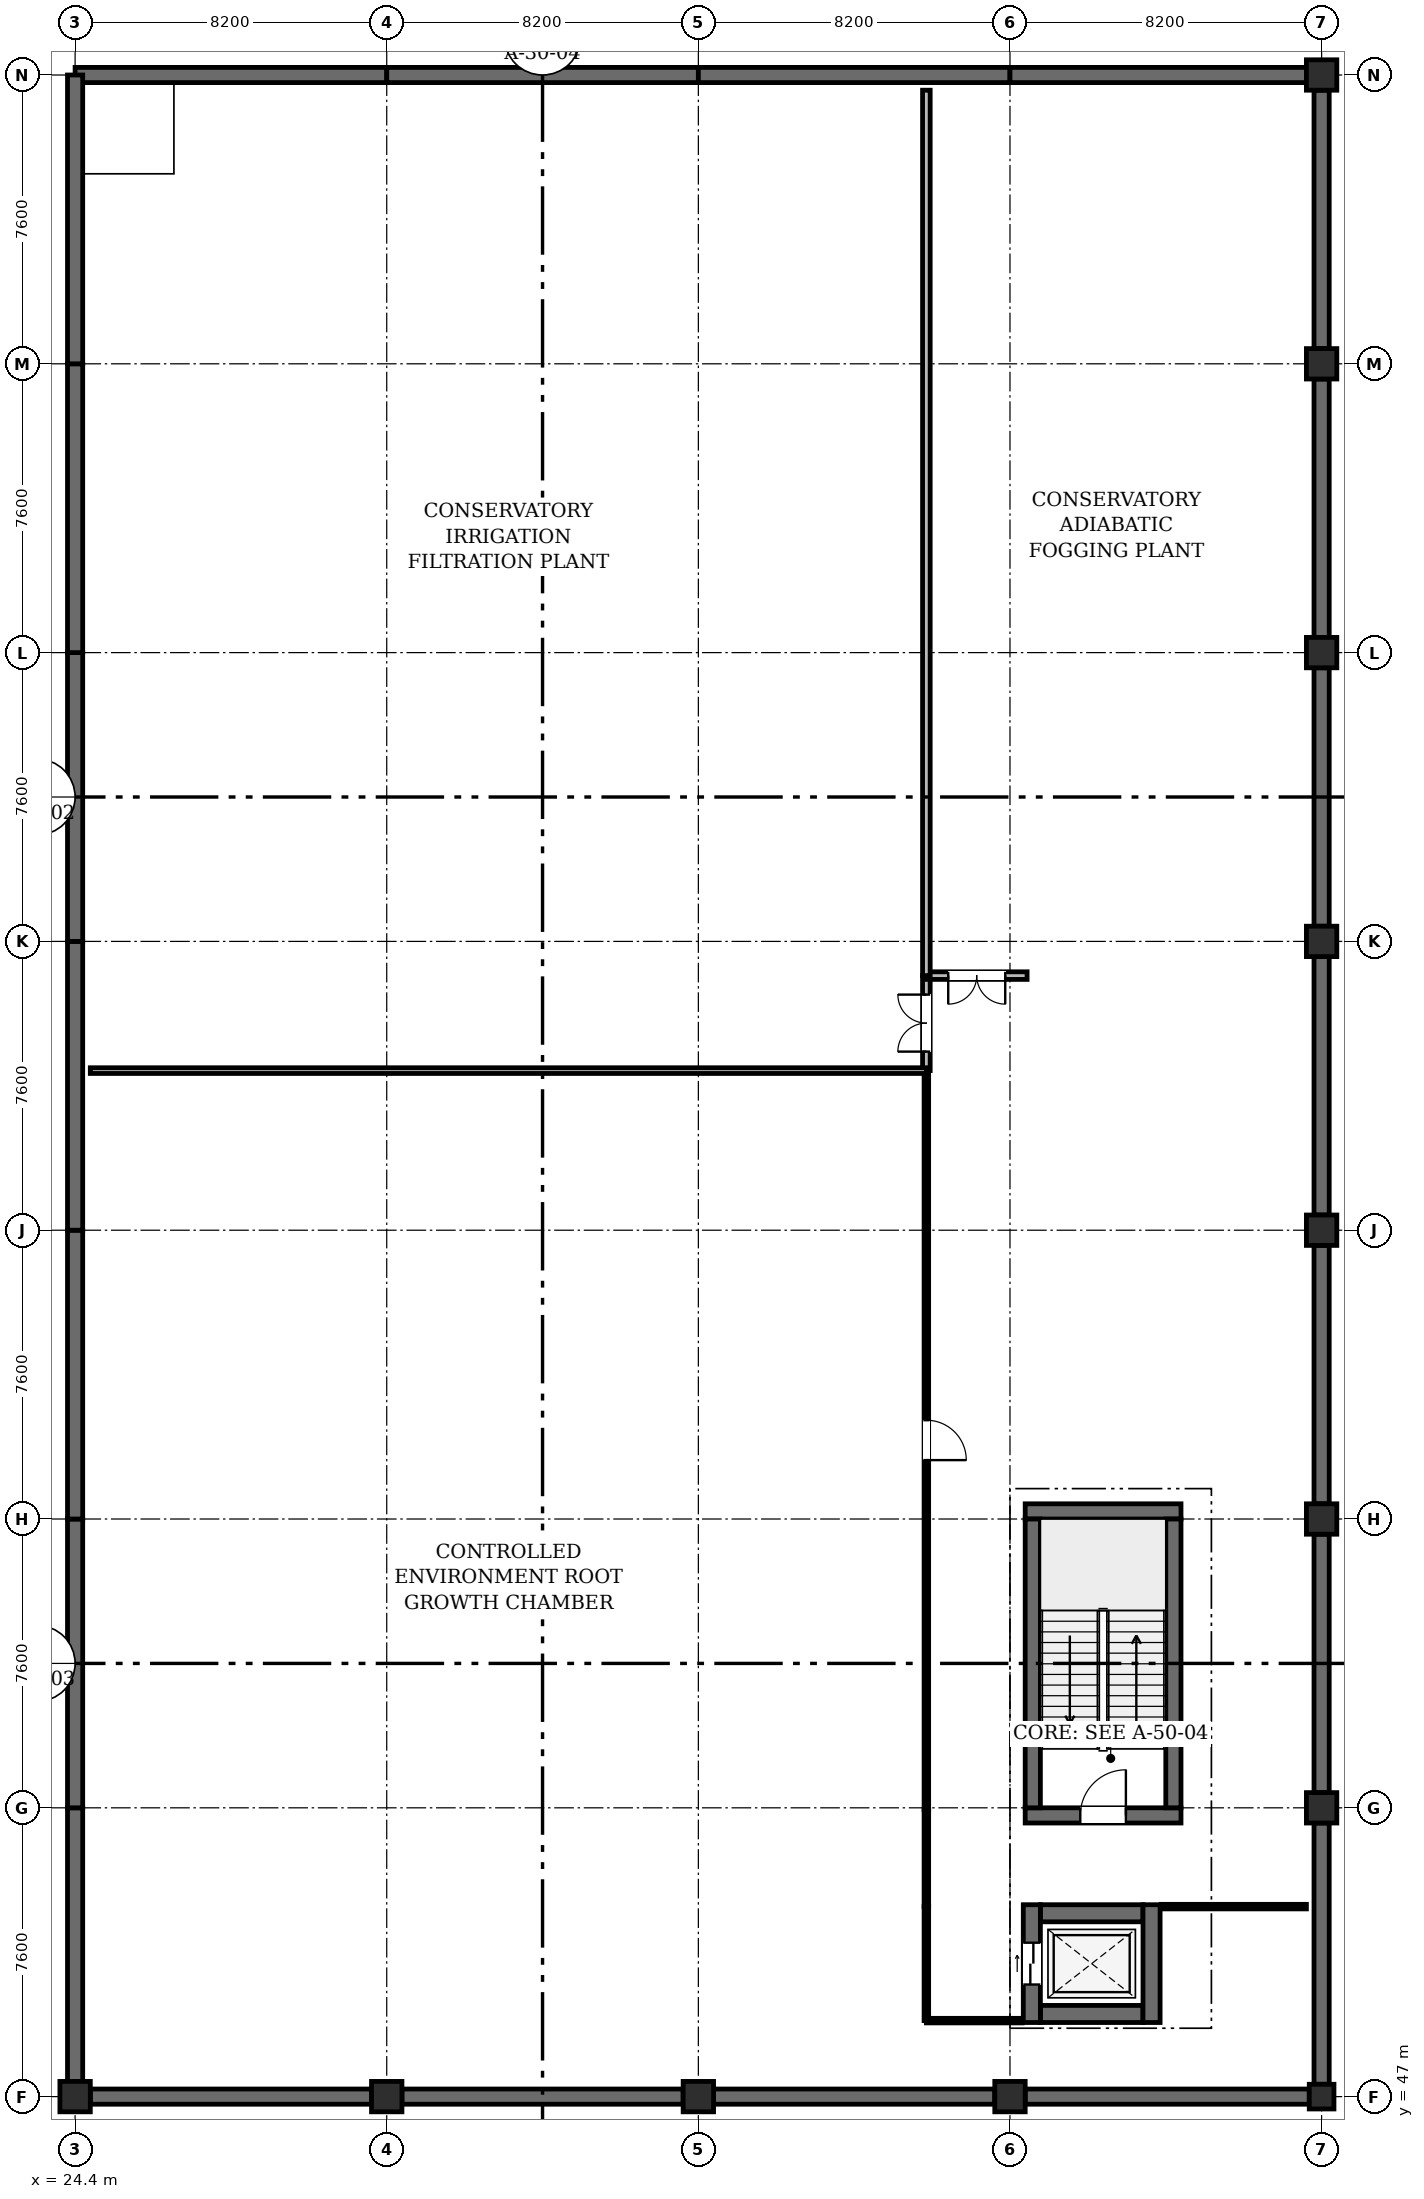
"""IFC4 building model, lengths in metres.
Left out: names, types, materials, properties, quantities, classifications, styles, units other than length and angle.
Written with IfcOpenShell. Run it as: python <this file> out.ifc"""

import sys

from ifc_helpers import new_model, si_unit, direction, frame, frame_2d, origin, origin_2d, place, context, subcontext, project, spatial, rectangle, circle, extrude, element, fill, save


model = new_model("IFC4")
c1 = context("Model", 3, precision=1e-05, world=origin(), true_north=direction((0.0, 1.0)))
c2 = subcontext(c1, "Body", "Model", "MODEL_VIEW")
j1 = project(units=[si_unit("LENGTHUNIT", "METRE"), si_unit("PLANEANGLEUNIT", "RADIAN")], contexts=[c1])
p1 = place(None, origin())
s1 = spatial("IfcSite", under=j1, at=p1, CompositionType="ELEMENT")
p2 = place(p1, origin())
s2 = spatial("IfcBuilding", under=s1, at=p2, CompositionType="ELEMENT")
p3 = place(p2, frame((0.0, 0.0, -4.8)))
s3 = spatial("IfcBuildingStorey", under=s2, at=p3, CompositionType="ELEMENT", Elevation=-4.8)
for number, where, z_axis, x_axis in (
    (1, (24.4, 47.0, 0.0), (0.0, 0.0, 1.0), (1.0, 0.0, 0.0)),
    (2, (32.6, 47.0, 0.0), (0.0, 0.0, 1.0), (1.0, 0.0, 0.0)),
    (3, (40.8, 47.0, 0.0), (0.0, 0.0, 1.0), (1.0, 0.0, 0.0)),
    (4, (49.0, 47.0, 0.0), (0.0, 0.0, 1.0), (1.0, 0.0, 0.0)),
):
    element("IfcColumn", number, at=place(p3, frame(where, z_axis=z_axis, x_axis=x_axis)), inside=s3, PredefinedType="COLUMN", context=c2, shape_type="SweptSolid", body=[
        extrude(circle(Radius=0.4, at=origin_2d()), origin(), (0.0, 0.0, 1.0), 4.46),
    ])
p4 = place(p3, frame((57.2, 47.0, 0.0), z_axis=(0.0, 0.0, 1.0), x_axis=(1.0, 0.0, 0.0)))
e5 = element("IfcColumn", 5, at=p4, inside=s3, PredefinedType="COLUMN", context=c2, shape_type="SweptSolid", body=[
    extrude(rectangle(XDim=0.65, YDim=0.65, at=origin_2d()), origin(), (0.0, 0.0, 1.0), 4.46),
])
for number, where, z_axis, x_axis in (
    (6, (57.2, 54.6, 0.0), (0.0, 0.0, 1.0), (1.0, 0.0, 0.0)),
    (7, (57.2, 62.2, 0.0), (0.0, 0.0, 1.0), (1.0, 0.0, 0.0)),
    (8, (57.2, 69.8, 0.0), (0.0, 0.0, 1.0), (1.0, 0.0, 0.0)),
    (9, (57.2, 77.4, 0.0), (0.0, 0.0, 1.0), (1.0, 0.0, 0.0)),
    (10, (57.2, 85.0, 0.0), (0.0, 0.0, 1.0), (1.0, 0.0, 0.0)),
    (11, (57.2, 92.6, 0.0), (0.0, 0.0, 1.0), (1.0, 0.0, 0.0)),
    (12, (57.2, 100.2, 0.0), (0.0, 0.0, 1.0), (1.0, 0.0, 0.0)),
):
    element("IfcColumn", number, at=place(p3, frame(where, z_axis=z_axis, x_axis=x_axis)), inside=s3, PredefinedType="COLUMN", context=c2, shape_type="SweptSolid", body=[
        extrude(circle(Radius=0.4, at=origin_2d()), origin(), (0.0, 0.0, 1.0), 4.46),
    ])
p5 = place(p3, frame((24.4, 100.2, 0.0), z_axis=(0.0, 0.0, 1.0), x_axis=(1.0, 0.0, 0.0)))
e13 = element("IfcWall", 13, at=p5, inside=s3, PredefinedType="SOLIDWALL", context=c2, shape_type="SweptSolid", body=[
    extrude(rectangle(XDim=8.2, YDim=0.4, at=frame_2d((4.1, 0.0))), origin(), (0.0, 0.0, 1.0), 4.46),
])
for number, where, z_axis, x_axis in (
    (14, (32.6, 100.2, 0.0), (0.0, 0.0, 1.0), (1.0, 0.0, 0.0)),
    (15, (40.8, 100.2, 0.0), (0.0, 0.0, 1.0), (1.0, 0.0, 0.0)),
):
    element("IfcWall", number, at=place(p3, frame(where, z_axis=z_axis, x_axis=x_axis)), inside=s3, PredefinedType="SOLIDWALL", context=c2, shape_type="SweptSolid", body=[
        extrude(rectangle(XDim=8.2, YDim=0.4, at=frame_2d((4.1, 0.0))), origin(), (0.0, 0.0, 1.0), 4.46),
    ])
p6 = place(p3, frame((49.0, 100.2, 0.0), z_axis=(0.0, 0.0, 1.0), x_axis=(1.0, 0.0, 0.0)))
e16 = element("IfcWall", 16, at=p6, inside=s3, PredefinedType="SOLIDWALL", context=c2, shape_type="SweptSolid", body=[
    extrude(rectangle(XDim=7.8, YDim=0.4, at=frame_2d((3.9, 0.0))), origin(), (0.0, 0.0, 1.0), 4.46),
])
p7 = place(p3, frame((57.2, 47.325, 0.0), z_axis=(0.0, 0.0, 1.0), x_axis=(0.0, 1.0, 0.0)))
e17 = element("IfcWall", 17, at=p7, inside=s3, PredefinedType="SOLIDWALL", context=c2, shape_type="SweptSolid", body=[
    extrude(rectangle(XDim=6.875, YDim=0.4, at=frame_2d((3.438, 0.0))), origin(), (0.0, 0.0, 1.0), 4.46),
])
p8 = place(p3, frame((57.2, 55.0, 0.0), z_axis=(0.0, 0.0, 1.0), x_axis=(0.0, 1.0, 0.0)))
e18 = element("IfcWall", 18, at=p8, inside=s3, PredefinedType="SOLIDWALL", context=c2, shape_type="SweptSolid", body=[
    extrude(rectangle(XDim=6.8, YDim=0.4, at=frame_2d((3.4, 0.0))), origin(), (0.0, 0.0, 1.0), 4.46),
])
p9 = place(p3, frame((57.2, 62.6, 0.0), z_axis=(0.0, 0.0, 1.0), x_axis=(0.0, 1.0, 0.0)))
e19 = element("IfcWall", 19, at=p9, inside=s3, PredefinedType="SOLIDWALL", context=c2, shape_type="SweptSolid", body=[
    extrude(rectangle(XDim=6.8, YDim=0.4, at=frame_2d((3.4, 0.0))), origin(), (0.0, 0.0, 1.0), 4.46),
])
for number, where, z_axis, x_axis in (
    (20, (57.2, 70.2, 0.0), (0.0, 0.0, 1.0), (0.0, 1.0, 0.0)),
    (21, (57.2, 77.8, 0.0), (0.0, 0.0, 1.0), (0.0, 1.0, 0.0)),
    (22, (57.2, 85.4, 0.0), (0.0, 0.0, 1.0), (0.0, 1.0, 0.0)),
    (23, (57.2, 93.0, 0.0), (0.0, 0.0, 1.0), (0.0, 1.0, 0.0)),
):
    element("IfcWall", number, at=place(p3, frame(where, z_axis=z_axis, x_axis=x_axis)), inside=s3, PredefinedType="SOLIDWALL", context=c2, shape_type="SweptSolid", body=[
        extrude(rectangle(XDim=6.8, YDim=0.4, at=frame_2d((3.4, 0.0))), origin(), (0.0, 0.0, 1.0), 4.46),
    ])
for number, where, z_axis, x_axis in (
    (24, (24.8, 47.0, 0.0), (0.0, 0.0, 1.0), (1.0, 0.0, 0.0)),
    (25, (33.0, 47.0, 0.0), (0.0, 0.0, 1.0), (1.0, 0.0, 0.0)),
):
    element("IfcWall", number, at=place(p3, frame(where, z_axis=z_axis, x_axis=x_axis)), inside=s3, PredefinedType="SOLIDWALL", context=c2, shape_type="SweptSolid", body=[
        extrude(rectangle(XDim=7.4, YDim=0.4, at=frame_2d((3.7, 0.0))), origin(), (0.0, 0.0, 1.0), 4.46),
    ])
p10 = place(p3, frame((41.2, 47.0, 0.0), z_axis=(0.0, 0.0, 1.0), x_axis=(1.0, 0.0, 0.0)))
e26 = element("IfcWall", 26, at=p10, inside=s3, PredefinedType="SOLIDWALL", context=c2, shape_type="SweptSolid", body=[
    extrude(rectangle(XDim=7.4, YDim=0.4, at=frame_2d((3.7, 0.0))), origin(), (0.0, 0.0, 1.0), 4.46),
])
p11 = place(p3, frame((49.4, 47.0, 0.0), z_axis=(0.0, 0.0, 1.0), x_axis=(1.0, 0.0, 0.0)))
e27 = element("IfcWall", 27, at=p11, inside=s3, PredefinedType="SOLIDWALL", context=c2, shape_type="SweptSolid", body=[
    extrude(rectangle(XDim=7.475, YDim=0.4, at=frame_2d((3.738, 0.0))), origin(), (0.0, 0.0, 1.0), 4.46),
])
p12 = place(p3, frame((24.4, 47.4, 0.0), z_axis=(0.0, 0.0, 1.0), x_axis=(0.0, 1.0, 0.0)))
e28 = element("IfcWall", 28, at=p12, inside=s3, PredefinedType="SOLIDWALL", context=c2, shape_type="SweptSolid", body=[
    extrude(rectangle(XDim=7.2, YDim=0.4, at=frame_2d((3.6, 0.0))), origin(), (0.0, 0.0, 1.0), 4.46),
])
p13 = place(p3, frame((24.4, 54.6, 0.0), z_axis=(0.0, 0.0, 1.0), x_axis=(0.0, 1.0, 0.0)))
e29 = element("IfcWall", 29, at=p13, inside=s3, PredefinedType="SOLIDWALL", context=c2, shape_type="SweptSolid", body=[
    extrude(rectangle(XDim=7.6, YDim=0.4, at=frame_2d((3.8, 0.0))), origin(), (0.0, 0.0, 1.0), 4.46),
])
p14 = place(p3, frame((24.4, 62.2, 0.0), z_axis=(0.0, 0.0, 1.0), x_axis=(0.0, 1.0, 0.0)))
e30 = element("IfcWall", 30, at=p14, inside=s3, PredefinedType="SOLIDWALL", context=c2, shape_type="SweptSolid", body=[
    extrude(rectangle(XDim=7.6, YDim=0.4, at=frame_2d((3.8, 0.0))), origin(), (0.0, 0.0, 1.0), 4.46),
])
p15 = place(p3, frame((24.4, 69.8, 0.0), z_axis=(0.0, 0.0, 1.0), x_axis=(0.0, 1.0, 0.0)))
e31 = element("IfcWall", 31, at=p15, inside=s3, PredefinedType="SOLIDWALL", context=c2, shape_type="SweptSolid", body=[
    extrude(rectangle(XDim=7.6, YDim=0.4, at=frame_2d((3.8, 0.0))), origin(), (0.0, 0.0, 1.0), 4.46),
])
for number, where, z_axis, x_axis in (
    (32, (24.4, 77.4, 0.0), (0.0, 0.0, 1.0), (0.0, 1.0, 0.0)),
    (33, (24.4, 85.0, 0.0), (0.0, 0.0, 1.0), (0.0, 1.0, 0.0)),
):
    element("IfcWall", number, at=place(p3, frame(where, z_axis=z_axis, x_axis=x_axis)), inside=s3, PredefinedType="SOLIDWALL", context=c2, shape_type="SweptSolid", body=[
        extrude(rectangle(XDim=7.6, YDim=0.4, at=frame_2d((3.8, 0.0))), origin(), (0.0, 0.0, 1.0), 4.46),
    ])
p16 = place(p3, frame((24.4, 92.6, 0.0), z_axis=(0.0, 0.0, 1.0), x_axis=(0.0, 1.0, 0.0)))
e34 = element("IfcWall", 34, at=p16, inside=s3, PredefinedType="SOLIDWALL", context=c2, shape_type="SweptSolid", body=[
    extrude(rectangle(XDim=7.6, YDim=0.4, at=frame_2d((3.8, 0.0))), origin(), (0.0, 0.0, 1.0), 4.46),
])
p17 = place(p3, frame((49.4, 54.4, 0.0), z_axis=(0.0, 0.0, 1.0), x_axis=(1.0, 0.0, 0.0)))
e35 = element("IfcWall", 35, at=p17, inside=s3, PredefinedType="SHEAR", context=c2, shape_type="SweptSolid", body=[
    extrude(rectangle(XDim=4.1, YDim=0.4, at=frame_2d((2.05, 0.0))), origin(), (0.0, 0.0, 1.0), 4.46),
])
p18 = place(p17, frame((1.45, 0.0, 0.0)))
e36 = element("IfcOpeningElement", 36, at=p18, cuts=e35, PredefinedType="OPENING", context=c2, shape_type="SweptSolid", body=[
    extrude(rectangle(XDim=1.2, YDim=2.2, at=frame_2d((0.6, 1.1))), frame((0.0, 0.212, 0.0), z_axis=(0.0, -1.0, 0.0), x_axis=(1.0, 0.0, 0.0)), (0.0, 0.0, 1.0), 0.424),
])
p19 = place(p3, frame((49.4, 62.4, 0.0), z_axis=(0.0, 0.0, 1.0), x_axis=(1.0, 0.0, 0.0)))
e37 = element("IfcWall", 37, at=p19, inside=s3, PredefinedType="SHEAR", context=c2, shape_type="SweptSolid", body=[
    extrude(rectangle(XDim=4.1, YDim=0.4, at=frame_2d((2.05, 0.0))), origin(), (0.0, 0.0, 1.0), 4.46),
])
for number, where, z_axis, x_axis in (
    (38, (49.6, 54.6, 0.0), (0.0, 0.0, 1.0), (0.0, 1.0, 0.0)),
    (39, (53.3, 54.6, 0.0), (0.0, 0.0, 1.0), (0.0, 1.0, 0.0)),
):
    element("IfcWall", number, at=place(p3, frame(where, z_axis=z_axis, x_axis=x_axis)), inside=s3, PredefinedType="SHEAR", context=c2, shape_type="SweptSolid", body=[
        extrude(rectangle(XDim=7.6, YDim=0.4, at=frame_2d((3.8, 0.0))), origin(), (0.0, 0.0, 1.0), 4.46),
    ])
for number, where, z_axis, x_axis in (
    (40, (49.8, 49.175, 0.0), (0.0, 0.0, 1.0), (1.0, 0.0, 0.0)),
    (41, (49.8, 51.825, 0.0), (0.0, 0.0, 1.0), (1.0, 0.0, 0.0)),
):
    element("IfcWall", number, at=place(p3, frame(where, z_axis=z_axis, x_axis=x_axis)), inside=s3, PredefinedType="SHEAR", context=c2, shape_type="SweptSolid", body=[
        extrude(rectangle(XDim=2.7, YDim=0.45, at=frame_2d((1.35, 0.0))), origin(), (0.0, 0.0, 1.0), 4.46),
    ])
p20 = place(p3, frame((49.575, 48.95, 0.0), z_axis=(0.0, 0.0, 1.0), x_axis=(0.0, 1.0, 0.0)))
e42 = element("IfcWall", 42, at=p20, inside=s3, PredefinedType="SHEAR", context=c2, shape_type="SweptSolid", body=[
    extrude(rectangle(XDim=3.1, YDim=0.45, at=frame_2d((1.55, 0.0))), origin(), (0.0, 0.0, 1.0), 4.46),
])
p21 = place(p20, frame((1.0, 0.0, 0.0)))
e43 = element("IfcOpeningElement", 43, at=p21, cuts=e42, PredefinedType="OPENING", context=c2, shape_type="SweptSolid", body=[
    extrude(rectangle(XDim=1.1, YDim=2.2, at=frame_2d((0.55, 1.1))), frame((0.0, 0.237, 0.0), z_axis=(0.0, -1.0, 0.0), x_axis=(1.0, 0.0, 0.0)), (0.0, 0.0, 1.0), 0.474),
])
p22 = place(p3, frame((52.725, 48.95, 0.0), z_axis=(0.0, 0.0, 1.0), x_axis=(0.0, 1.0, 0.0)))
e44 = element("IfcWall", 44, at=p22, inside=s3, PredefinedType="SHEAR", context=c2, shape_type="SweptSolid", body=[
    extrude(rectangle(XDim=3.1, YDim=0.45, at=frame_2d((1.55, 0.0))), origin(), (0.0, 0.0, 1.0), 4.46),
])
p23 = place(p3, frame((46.8, 49.0, 0.0), z_axis=(0.0, 0.0, 1.0), x_axis=(0.0, 1.0, 0.0)))
e45 = element("IfcWall", 45, at=p23, inside=s3, PredefinedType="PARTITIONING", context=c2, shape_type="SweptSolid", body=[
    extrude(rectangle(XDim=3.0, YDim=0.12, at=frame_2d((1.5, 0.0))), origin(), (0.0, 0.0, 1.0), 4.405),
])
p24 = place(p3, frame((46.8, 52.0, 0.0), z_axis=(0.0, 0.0, 1.0), x_axis=(0.0, 1.0, 0.0)))
e46 = element("IfcWall", 46, at=p24, inside=s3, PredefinedType="PARTITIONING", context=c2, shape_type="SweptSolid", body=[
    extrude(rectangle(XDim=2.55, YDim=0.12, at=frame_2d((1.275, 0.0))), origin(), (0.0, 0.0, 1.0), 4.405),
])
p25 = place(p3, frame((46.8, 54.55, 0.0), z_axis=(0.0, 0.0, 1.0), x_axis=(0.0, 1.0, 0.0)))
e47 = element("IfcWall", 47, at=p25, inside=s3, PredefinedType="PARTITIONING", context=c2, shape_type="SweptSolid", body=[
    extrude(rectangle(XDim=19.45, YDim=0.12, at=frame_2d((9.725, 0.0))), origin(), (0.0, 0.0, 1.0), 4.405),
])
p26 = place(p25, frame((9.2, 0.0, 0.0)))
e48 = element("IfcOpeningElement", 48, at=p26, cuts=e47, PredefinedType="OPENING", context=c2, shape_type="SweptSolid", body=[
    extrude(rectangle(XDim=1.05, YDim=2.2, at=frame_2d((0.525, 1.1))), frame((0.0, 0.072, 0.0), z_axis=(0.0, -1.0, 0.0), x_axis=(1.0, 0.0, 0.0)), (0.0, 0.0, 1.0), 0.144),
])
p27 = place(p3, frame((56.8, 52.0, 0.0), z_axis=(0.0, 0.0, 1.0), x_axis=(-1.0, 0.0, 0.0)))
e49 = element("IfcWall", 49, at=p27, inside=s3, PredefinedType="PARTITIONING", context=c2, shape_type="SweptSolid", body=[
    extrude(rectangle(XDim=3.82, YDim=0.12, at=frame_2d((1.91, 0.0))), origin(), (0.0, 0.0, 1.0), 4.405),
])
p28 = place(p3, frame((49.32, 49.0, 0.0), z_axis=(0.0, 0.0, 1.0), x_axis=(-1.0, 0.0, 0.0)))
e50 = element("IfcWall", 50, at=p28, inside=s3, PredefinedType="PARTITIONING", context=c2, shape_type="SweptSolid", body=[
    extrude(rectangle(XDim=2.52, YDim=0.12, at=frame_2d((1.26, 0.0))), origin(), (0.0, 0.0, 1.0), 4.405),
])
p29 = place(p3, frame((46.8, 74.0, 0.0), z_axis=(0.0, 0.0, 1.0), x_axis=(0.0, 1.0, 0.0)))
e51 = element("IfcWall", 51, at=p29, inside=s3, PredefinedType="PARTITIONING", context=c2, shape_type="SweptSolid", body=[
    extrude(rectangle(XDim=2.5, YDim=0.2, at=frame_2d((1.25, 0.0))), origin(), (0.0, 0.0, 1.0), 4.405),
])
p30 = place(p29, frame((0.5, 0.0, 0.0)))
e52 = element("IfcOpeningElement", 52, at=p30, cuts=e51, PredefinedType="OPENING", context=c2, shape_type="SweptSolid", body=[
    extrude(rectangle(XDim=1.5, YDim=2.2, at=frame_2d((0.75, 1.1))), frame((0.0, 0.112, 0.0), z_axis=(0.0, -1.0, 0.0), x_axis=(1.0, 0.0, 0.0)), (0.0, 0.0, 1.0), 0.224),
])
p31 = place(p3, frame((46.8, 76.5, 0.0), z_axis=(0.0, 0.0, 1.0), x_axis=(1.0, 0.0, 0.0)))
e53 = element("IfcWall", 53, at=p31, inside=s3, PredefinedType="PARTITIONING", context=c2, shape_type="SweptSolid", body=[
    extrude(rectangle(XDim=2.65, YDim=0.2, at=frame_2d((1.325, 0.0))), origin(), (0.0, 0.0, 1.0), 4.405),
])
p32 = place(p31, frame((0.575, 0.0, 0.0)))
e54 = element("IfcOpeningElement", 54, at=p32, cuts=e53, PredefinedType="OPENING", context=c2, shape_type="SweptSolid", body=[
    extrude(rectangle(XDim=1.5, YDim=2.2, at=frame_2d((0.75, 1.1))), frame((0.0, 0.112, 0.0), z_axis=(0.0, -1.0, 0.0), x_axis=(1.0, 0.0, 0.0)), (0.0, 0.0, 1.0), 0.224),
])
p33 = place(p3, frame((24.8, 74.0, 0.0), z_axis=(0.0, 0.0, 1.0), x_axis=(1.0, 0.0, 0.0)))
e55 = element("IfcWall", 55, at=p33, inside=s3, PredefinedType="PARTITIONING", context=c2, shape_type="SweptSolid", body=[
    extrude(rectangle(XDim=22.0, YDim=0.15, at=frame_2d((11.0, 0.0))), origin(), (0.0, 0.0, 1.0), 4.405),
])
p34 = place(p3, frame((46.8, 99.8, 0.0), z_axis=(0.0, 0.0, 1.0), x_axis=(0.0, -1.0, 0.0)))
e56 = element("IfcWall", 56, at=p34, inside=s3, PredefinedType="PARTITIONING", context=c2, shape_type="SweptSolid", body=[
    extrude(rectangle(XDim=23.3, YDim=0.2, at=frame_2d((11.65, 0.0))), origin(), (0.0, 0.0, 1.0), 4.405),
])
p35 = place(p18, origin())
e57 = element("IfcDoor", 57, at=p35, inside=s3, OperationType="SINGLE_SWING_RIGHT", PredefinedType="DOOR", context=c2, shape_type="SweptSolid", body=[
    extrude(rectangle(XDim=1.2, YDim=2.2, at=frame_2d((0.6, 1.1))), frame((0.0, 0.025, 0.0), z_axis=(0.0, -1.0, 0.0), x_axis=(1.0, 0.0, 0.0)), (0.0, 0.0, 1.0), 0.05),
])
fill(e36, e57)
p36 = place(p21, origin())
e58 = element("IfcDoor", 58, at=p36, inside=s3, OperationType="DOUBLE_DOOR_SLIDING", PredefinedType="DOOR", context=c2, shape_type="SweptSolid", body=[
    extrude(rectangle(XDim=1.1, YDim=2.2, at=frame_2d((0.55, 1.1))), frame((0.0, 0.025, 0.0), z_axis=(0.0, -1.0, 0.0), x_axis=(1.0, 0.0, 0.0)), (0.0, 0.0, 1.0), 0.05),
])
fill(e43, e58)
p37 = place(p26, frame((1.05, 0.0, 0.0), z_axis=(0.0, 0.0, 1.0), x_axis=(-1.0, 0.0, 0.0)))
e59 = element("IfcDoor", 59, at=p37, inside=s3, OperationType="SINGLE_SWING_RIGHT", PredefinedType="DOOR", context=c2, shape_type="SweptSolid", body=[
    extrude(rectangle(XDim=1.05, YDim=2.2, at=frame_2d((0.525, 1.1))), frame((0.0, 0.025, 0.0), z_axis=(0.0, -1.0, 0.0), x_axis=(1.0, 0.0, 0.0)), (0.0, 0.0, 1.0), 0.05),
])
fill(e48, e59)
p38 = place(p30, origin())
e60 = element("IfcDoor", 60, at=p38, inside=s3, OperationType="DOUBLE_DOOR_SINGLE_SWING", PredefinedType="DOOR", context=c2, shape_type="SweptSolid", body=[
    extrude(rectangle(XDim=1.5, YDim=2.2, at=frame_2d((0.75, 1.1))), frame((0.0, 0.025, 0.0), z_axis=(0.0, -1.0, 0.0), x_axis=(1.0, 0.0, 0.0)), (0.0, 0.0, 1.0), 0.05),
])
fill(e52, e60)
p39 = place(p32, frame((1.5, 0.0, 0.0), z_axis=(0.0, 0.0, 1.0), x_axis=(-1.0, 0.0, 0.0)))
e61 = element("IfcDoor", 61, at=p39, inside=s3, OperationType="DOUBLE_DOOR_SINGLE_SWING", PredefinedType="DOOR", context=c2, shape_type="SweptSolid", body=[
    extrude(rectangle(XDim=1.5, YDim=2.2, at=frame_2d((0.75, 1.1))), frame((0.0, 0.025, 0.0), z_axis=(0.0, -1.0, 0.0), x_axis=(1.0, 0.0, 0.0)), (0.0, 0.0, 1.0), 0.05),
])
fill(e54, e61)
save(model, sys.argv[1])
